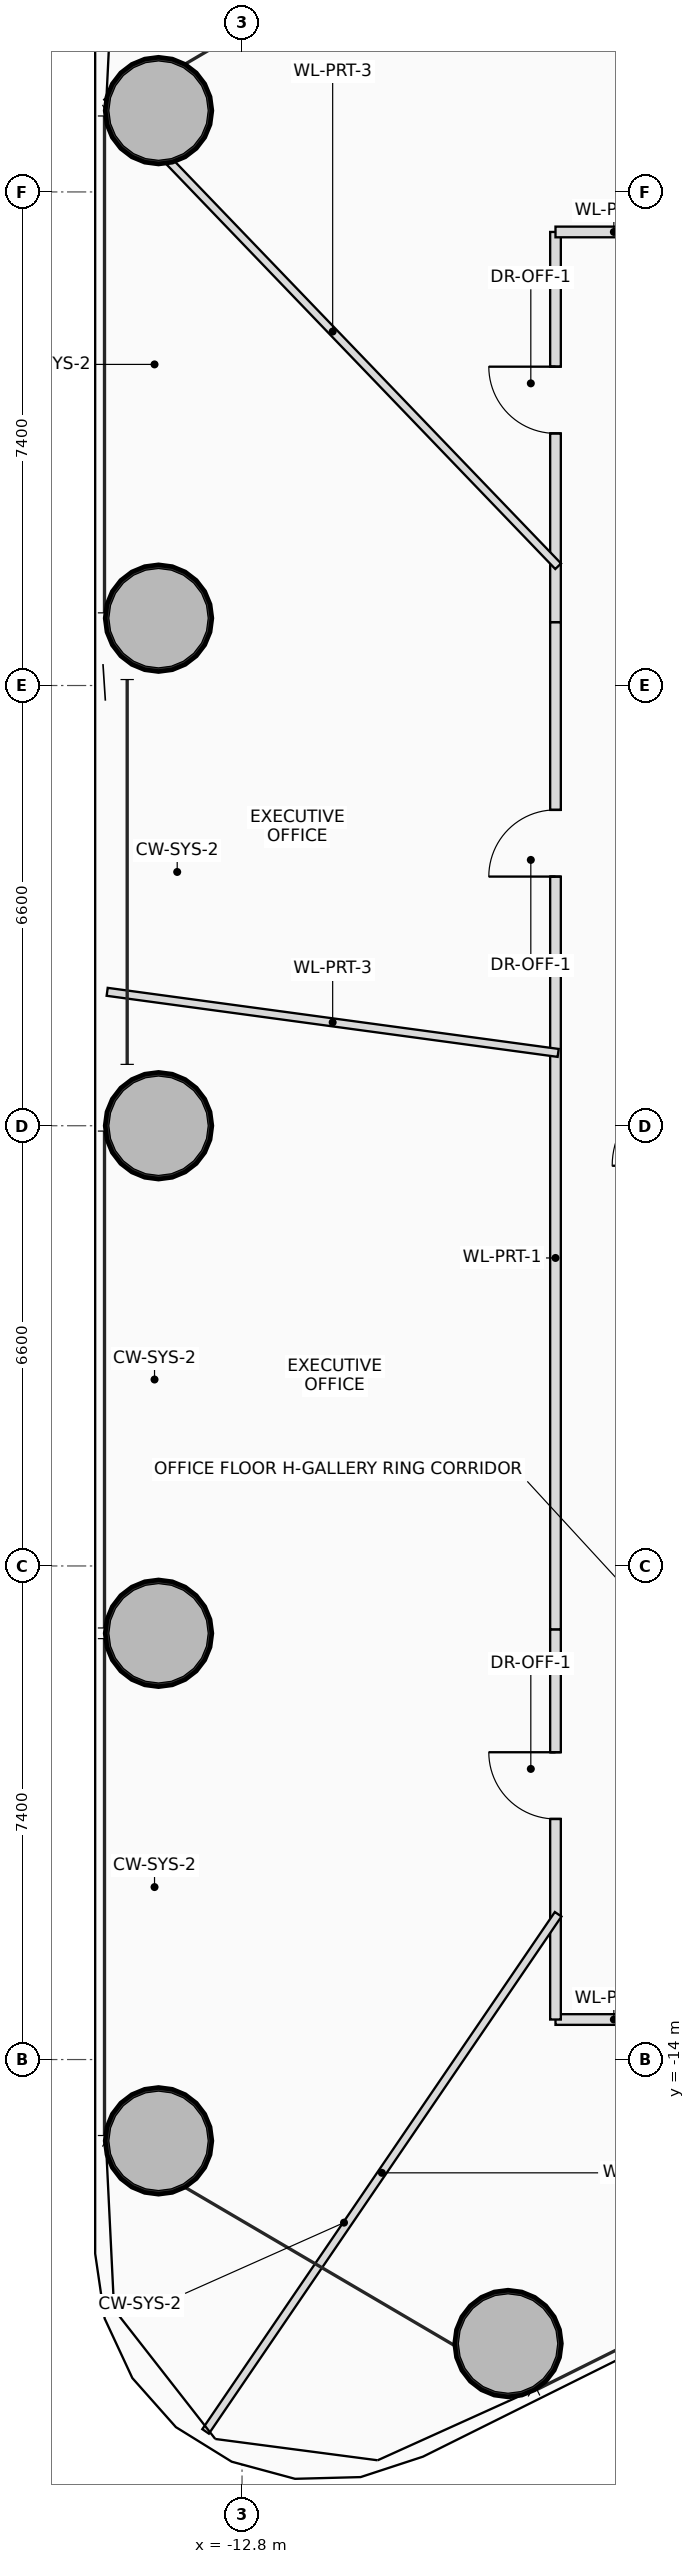
"""IFC4 building model, lengths in metres.
Left out: names, types, materials, properties, quantities, classifications, styles, units other than length and angle.
Written with IfcOpenShell. Run it as: python <this file> out.ifc"""

import sys

from ifc_helpers import new_model, si_unit, direction, frame, frame_2d, origin, origin_2d, place, context, subcontext, project, spatial, rectangle, hollow_circle, extrude, source, transform, mapped, element, fill, save


model = new_model("IFC4")
c1 = context("Model", 3, precision=1e-05, world=origin(), true_north=direction((0.0, 1.0)))
c2 = subcontext(c1, "Body", "Model", "MODEL_VIEW")
j1 = project(units=[si_unit("LENGTHUNIT", "METRE"), si_unit("PLANEANGLEUNIT", "RADIAN")], contexts=[c1])
p1 = place(None, origin())
s1 = spatial("IfcSite", under=j1, at=p1, CompositionType="ELEMENT")
p2 = place(p1, origin())
s2 = spatial("IfcBuilding", under=s1, at=p2, CompositionType="ELEMENT")
p3 = place(p2, frame((0.0, 0.0, 38.6)))
s3 = spatial("IfcBuildingStorey", under=s2, at=p3, CompositionType="ELEMENT", Elevation=38.6)
m1 = source(origin(), c2, "Body", "SweptSolid", [
    extrude(hollow_circle(Radius=0.8, WallThickness=0.055, at=origin_2d()), origin(), (0.0, 0.0, 1.0), 3.7),
])
for number, where, z_axis, x_axis in (
    (1, (-8.812, -18.258, 0.0), (0.0, 0.0, 1.0), (1.0, 0.0, 0.0)),
    (2, (-14.052, 15.219, 0.0), (0.0, 0.0, 1.0), (1.0, 0.0, 0.0)),
    (3, (-14.052, 7.61, 0.0), (0.0, 0.0, 1.0), (1.0, 0.0, 0.0)),
    (4, (-14.052, 0.0, 0.0), (0.0, 0.0, 1.0), (1.0, 0.0, 0.0)),
    (5, (-14.052, -7.61, 0.0), (0.0, 0.0, 1.0), (1.0, 0.0, 0.0)),
    (6, (-14.052, -15.219, 0.0), (0.0, 0.0, 1.0), (1.0, 0.0, 0.0)),
):
    element("IfcColumn", number, at=place(p3, frame(where, z_axis=z_axis, x_axis=x_axis)), inside=s3, PredefinedType="COLUMN", context=c2, shape_type="MappedRepresentation", body=[
        mapped(m1, transform((0.0, 0.0, 0.0), scale=1.0)),
    ])
p4 = place(p3, frame((-6.35, -13.4, 0.0), z_axis=(0.0, 0.0, 1.0), x_axis=(-1.0, 0.0, 0.0)))
e7 = element("IfcWall", 7, at=p4, inside=s3, PredefinedType="PARTITIONING", context=c2, shape_type="SweptSolid", body=[
    extrude(rectangle(XDim=1.75, YDim=0.16, at=frame_2d((0.875, 0.0))), origin(), (0.0, 0.0, 1.0), 2.8),
])
p5 = place(p3, frame((-8.1, -13.4, 0.0), z_axis=(0.0, 0.0, 1.0), x_axis=(0.0, 1.0, 0.0)))
e8 = element("IfcWall", 8, at=p5, inside=s3, PredefinedType="PARTITIONING", context=c2, shape_type="SweptSolid", body=[
    extrude(rectangle(XDim=5.85, YDim=0.16, at=frame_2d((2.925, 0.0))), origin(), (0.0, 0.0, 1.0), 2.8),
])
p6 = place(p5, frame((3.007, 0.0, 0.0)))
e9 = element("IfcOpeningElement", 9, at=p6, cuts=e8, PredefinedType="OPENING", context=c2, shape_type="SweptSolid", body=[
    extrude(rectangle(XDim=1.0, YDim=2.25, at=frame_2d((0.5, 1.125))), frame((0.0, 0.09, 0.0), z_axis=(0.0, -1.0, 0.0), x_axis=(1.0, 0.0, 0.0)), (0.0, 0.0, 1.0), 0.18),
])
p7 = place(p3, frame((-8.1, -7.55, 0.0), z_axis=(0.0, 0.0, 1.0), x_axis=(0.0, 1.0, 0.0)))
e10 = element("IfcWall", 10, at=p7, inside=s3, PredefinedType="PARTITIONING", context=c2, shape_type="SweptSolid", body=[
    extrude(rectangle(XDim=15.1, YDim=0.16, at=frame_2d((7.55, 0.0))), origin(), (0.0, 0.0, 1.0), 2.8),
])
p8 = place(p7, frame((11.285, 0.0, 0.0)))
e11 = element("IfcOpeningElement", 11, at=p8, cuts=e10, PredefinedType="OPENING", context=c2, shape_type="SweptSolid", body=[
    extrude(rectangle(XDim=1.0, YDim=2.25, at=frame_2d((0.5, 1.125))), frame((0.0, 0.09, 0.0), z_axis=(0.0, -1.0, 0.0), x_axis=(1.0, 0.0, 0.0)), (0.0, 0.0, 1.0), 0.18),
])
p9 = place(p3, frame((-8.1, 7.55, 0.0), z_axis=(0.0, 0.0, 1.0), x_axis=(0.0, 1.0, 0.0)))
e12 = element("IfcWall", 12, at=p9, inside=s3, PredefinedType="PARTITIONING", context=c2, shape_type="SweptSolid", body=[
    extrude(rectangle(XDim=5.85, YDim=0.16, at=frame_2d((2.925, 0.0))), origin(), (0.0, 0.0, 1.0), 2.8),
])
p10 = place(p9, frame((2.83, 0.0, 0.0)))
e13 = element("IfcOpeningElement", 13, at=p10, cuts=e12, PredefinedType="OPENING", context=c2, shape_type="SweptSolid", body=[
    extrude(rectangle(XDim=1.0, YDim=2.25, at=frame_2d((0.5, 1.125))), frame((0.0, 0.09, 0.0), z_axis=(0.0, -1.0, 0.0), x_axis=(1.0, 0.0, 0.0)), (0.0, 0.0, 1.0), 0.18),
])
p11 = place(p3, frame((-8.1, 13.4, 0.0), z_axis=(0.0, 0.0, 1.0), x_axis=(1.0, 0.0, 0.0)))
e14 = element("IfcWall", 14, at=p11, inside=s3, PredefinedType="PARTITIONING", context=c2, shape_type="SweptSolid", body=[
    extrude(rectangle(XDim=1.75, YDim=0.16, at=frame_2d((0.875, 0.0))), origin(), (0.0, 0.0, 1.0), 2.8),
])
p12 = place(p3, frame((-8.06, 8.388, 0.0), z_axis=(0.0, 0.0, 1.0), x_axis=(-0.692869708489, 0.721062803823, 0.0)))
e15 = element("IfcWall", 15, at=p12, inside=s3, PredefinedType="PARTITIONING", context=c2, shape_type="SweptSolid", body=[
    extrude(rectangle(XDim=9.759, YDim=0.12, at=frame_2d((4.88, 0.0))), origin(), (0.0, 0.0, 1.0), 2.8),
])
p13 = place(p3, frame((-8.06, 1.092, 0.0), z_axis=(0.0, 0.0, 1.0), x_axis=(-0.990948874496, 0.13423981576, 0.0)))
e16 = element("IfcWall", 16, at=p13, inside=s3, PredefinedType="PARTITIONING", context=c2, shape_type="SweptSolid", body=[
    extrude(rectangle(XDim=6.824, YDim=0.12, at=frame_2d((3.412, 0.0))), origin(), (0.0, 0.0, 1.0), 2.96),
])
p14 = place(p3, frame((-8.06, -11.822, 0.0), z_axis=(0.0, 0.0, 1.0), x_axis=(-0.56331583488, -0.826241653618, 0.0)))
e17 = element("IfcWall", 17, at=p14, inside=s3, PredefinedType="PARTITIONING", context=c2, shape_type="SweptSolid", body=[
    extrude(rectangle(XDim=9.384, YDim=0.12, at=frame_2d((4.692, 0.0))), origin(), (0.0, 0.0, 1.0), 2.96),
])
p15 = place(p6, origin())
e18 = element("IfcDoor", 18, at=p15, inside=s3, OperationType="SINGLE_SWING_RIGHT", PredefinedType="DOOR", context=c2, shape_type="SweptSolid", body=[
    extrude(rectangle(XDim=1.0, YDim=2.25, at=frame_2d((0.5, 1.125))), frame((0.0, 0.025, 0.0), z_axis=(0.0, -1.0, 0.0), x_axis=(1.0, 0.0, 0.0)), (0.0, 0.0, 1.0), 0.05),
])
fill(e9, e18)
p16 = place(p8, origin())
e19 = element("IfcDoor", 19, at=p16, inside=s3, OperationType="SINGLE_SWING_LEFT", PredefinedType="DOOR", context=c2, shape_type="SweptSolid", body=[
    extrude(rectangle(XDim=1.0, YDim=2.25, at=frame_2d((0.5, 1.125))), frame((0.0, 0.025, 0.0), z_axis=(0.0, -1.0, 0.0), x_axis=(1.0, 0.0, 0.0)), (0.0, 0.0, 1.0), 0.05),
])
fill(e11, e19)
p17 = place(p10, origin())
e20 = element("IfcDoor", 20, at=p17, inside=s3, OperationType="SINGLE_SWING_RIGHT", PredefinedType="DOOR", context=c2, shape_type="SweptSolid", body=[
    extrude(rectangle(XDim=1.0, YDim=2.25, at=frame_2d((0.5, 1.125))), frame((0.0, 0.025, 0.0), z_axis=(0.0, -1.0, 0.0), x_axis=(1.0, 0.0, 0.0)), (0.0, 0.0, 1.0), 0.05),
])
fill(e13, e20)
save(model, sys.argv[1])
